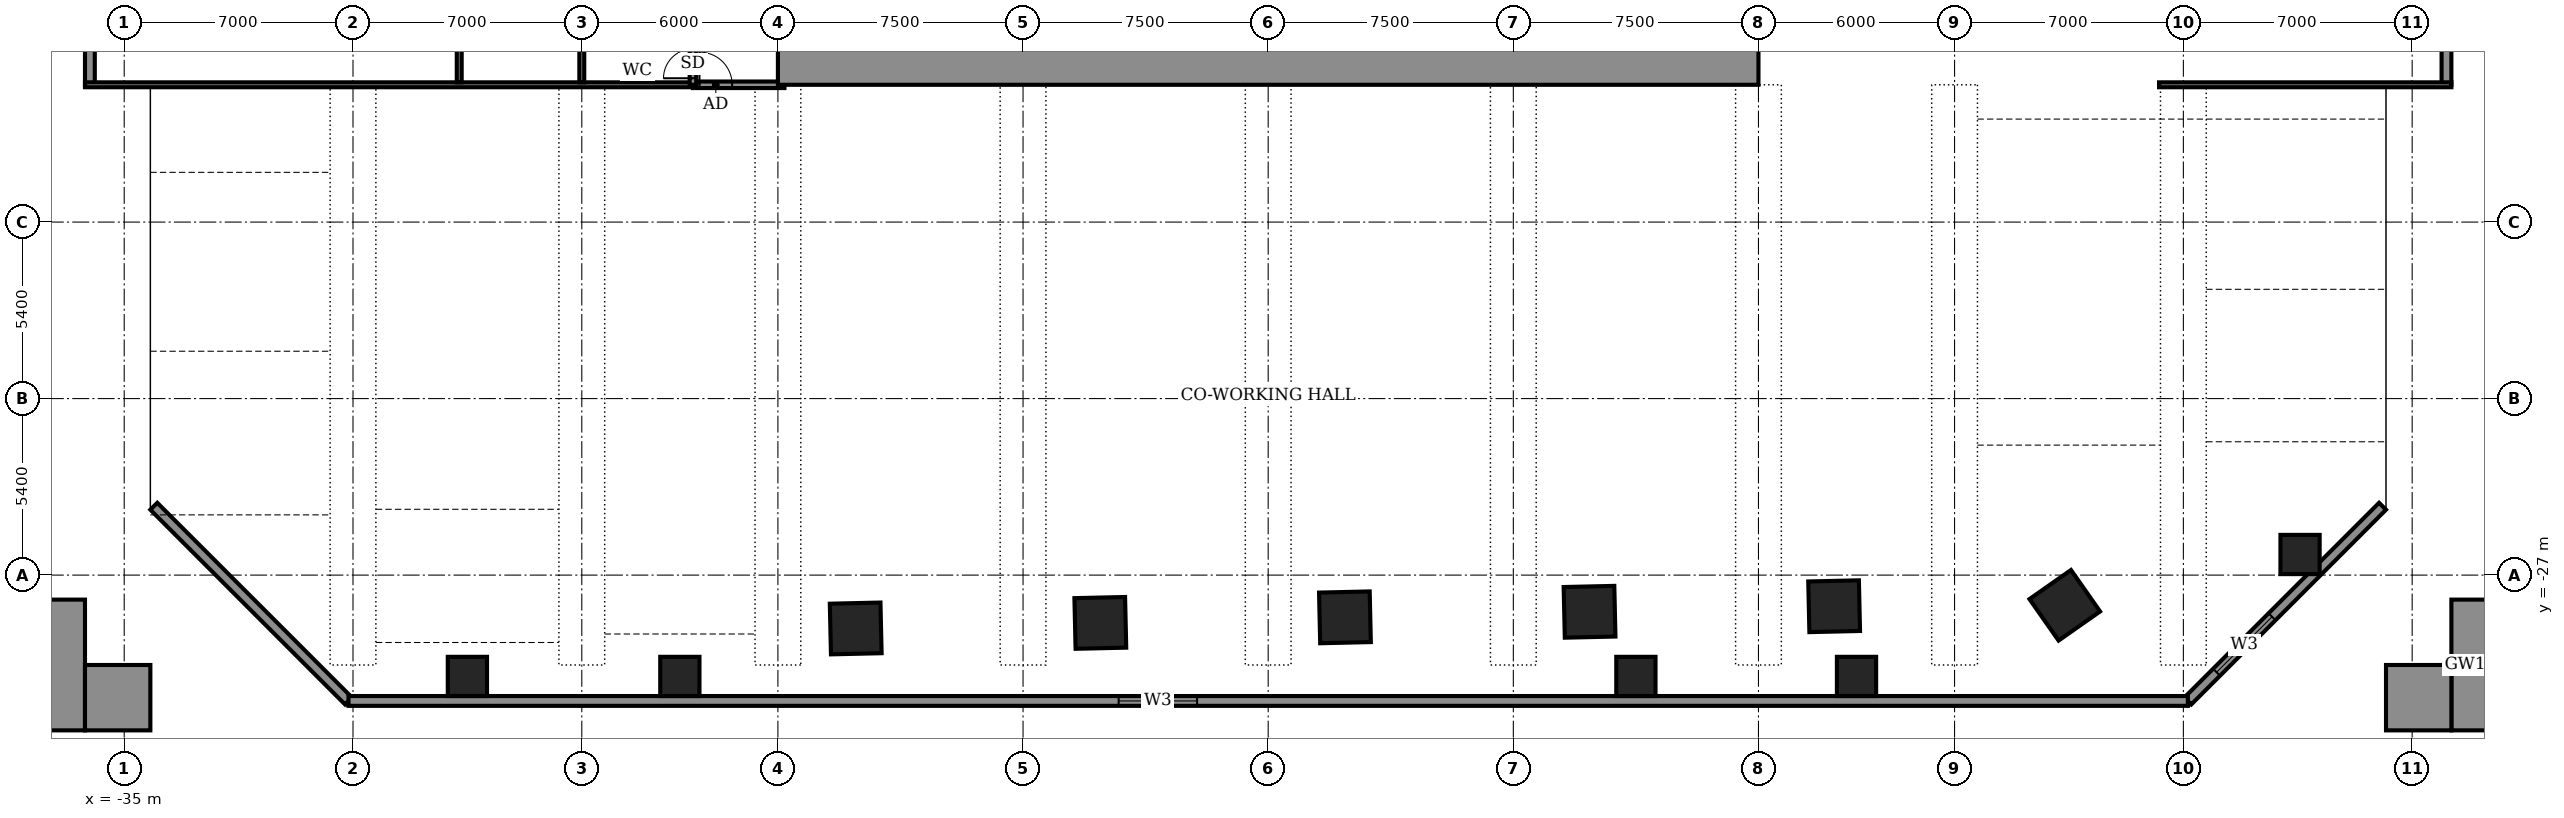
"""IFC4 building model, lengths in metres.
Left out: names, types, materials, properties, quantities, classifications, styles, units other than length and angle.
Written with IfcOpenShell. Run it as: python <this file> out.ifc"""

import sys

from ifc_helpers import new_model, si_unit, direction, frame, frame_2d, origin, origin_2d, place, context, subcontext, project, spatial, rectangle, extrude, element, fill, save


model = new_model("IFC4")
c1 = context("Model", 3, precision=1e-05, world=origin(), true_north=direction((0.0, 1.0)))
c2 = subcontext(c1, "Body", "Model", "MODEL_VIEW")
j1 = project(units=[si_unit("LENGTHUNIT", "METRE"), si_unit("PLANEANGLEUNIT", "RADIAN")], contexts=[c1])
p1 = place(None, origin())
s1 = spatial("IfcSite", under=j1, at=p1, CompositionType="ELEMENT")
p2 = place(p1, origin())
s2 = spatial("IfcBuilding", under=s1, at=p2, CompositionType="ELEMENT")
p3 = place(p2, frame((0.0, 0.0, 20.5)))
s3 = spatial("IfcBuildingStorey", under=s2, at=p3, CompositionType="ELEMENT", Elevation=20.5)
for number, where, z_axis, x_axis in (
    (1, (-12.62, -28.632, -0.55), (0.0, 0.0, 1.0), (1.0, 0.023, 0.0)),
    (2, (-5.135, -28.462, -0.55), (0.0, 0.0, 1.0), (1.0, 0.023, 0.0)),
    (3, (2.348, -28.292, -0.55), (0.0, 0.0, 1.0), (1.0, 0.023, 0.0)),
    (4, (9.833, -28.122, -0.55), (0.0, 0.0, 1.0), (1.0, 0.023, 0.0)),
    (5, (17.315, -27.952, -0.55), (0.0, 0.0, 1.0), (1.0, 0.023, 0.0)),
    (6, (24.372, -27.923, -0.55), (0.0, 0.0, 1.0), (0.819, 0.574, 0.0)),
):
    element("IfcColumn", number, at=place(p3, frame(where, z_axis=z_axis, x_axis=x_axis)), inside=s3, PredefinedType="COLUMN", context=c2, shape_type="SweptSolid", body=[
        extrude(rectangle(XDim=1.55, YDim=1.55, at=origin_2d()), origin(), (0.0, 0.0, 1.0), 4.5),
    ])
for number, where, z_axis, x_axis in (
    (7, (-24.5, -30.1, -0.55), (0.0, 0.0, 1.0), (1.0, 0.0, 0.0)),
    (8, (-18.0, -30.1, -0.55), (0.0, 0.0, 1.0), (1.0, 0.0, 0.0)),
    (9, (11.25, -30.1, -0.55), (0.0, 0.0, 1.0), (1.0, 0.0, 0.0)),
    (10, (18.0, -30.1, -0.55), (0.0, 0.0, 1.0), (1.0, 0.0, 0.0)),
    (11, (31.57, -26.37, -0.55), (0.0, 0.0, 1.0), (1.0, 0.0, 0.0)),
):
    element("IfcColumn", number, at=place(p3, frame(where, z_axis=z_axis, x_axis=x_axis)), inside=s3, PredefinedType="COLUMN", context=c2, shape_type="SweptSolid", body=[
        extrude(rectangle(XDim=1.2, YDim=1.2, at=origin_2d()), origin(), (0.0, 0.0, 1.0), 4.5),
    ])
p4 = place(p3, frame((28.138, -30.85, 0.0), z_axis=(0.0, 0.0, 1.0), x_axis=(0.707106781187, 0.707106781187, 0.0)))
e12 = element("IfcWall", 12, at=p4, inside=s3, PredefinedType="SOLIDWALL", context=c2, shape_type="SweptSolid", body=[
    extrude(rectangle(XDim=8.423, YDim=0.3, at=frame_2d((4.211, 0.0))), origin(), (0.0, 0.0, 1.0), 3.95),
])
p5 = place(p4, frame((1.242, 0.0, 0.9)))
e13 = element("IfcOpeningElement", 13, at=p5, cuts=e12, PredefinedType="OPENING", context=c2, shape_type="SweptSolid", body=[
    extrude(rectangle(XDim=2.4, YDim=1.8, at=frame_2d((1.2, 0.9))), frame((0.0, 0.16, 0.0), z_axis=(0.0, -1.0, 0.0), x_axis=(1.0, 0.0, 0.0)), (0.0, 0.0, 1.0), 0.32),
])
for number, where, z_axis, x_axis in (
    (14, (36.05, -12.0, 0.0), (0.0, 0.0, 1.0), (0.0, 1.0, 0.0)),
    (15, (-36.05, -5.236, 0.0), (0.0, 0.0, 1.0), (0.0, -1.0, 0.0)),
):
    element("IfcWall", number, at=place(p3, frame(where, z_axis=z_axis, x_axis=x_axis)), inside=s3, PredefinedType="SOLIDWALL", context=c2, shape_type="SweptSolid", body=[
        extrude(rectangle(XDim=6.764, YDim=0.3, at=frame_2d((3.382, 0.0))), origin(), (0.0, 0.0, 1.0), 3.95),
    ])
p6 = place(p3, frame((-34.094, -24.894, 0.0), z_axis=(0.0, 0.0, 1.0), x_axis=(0.707106781187, -0.707106781187, 0.0)))
e16 = element("IfcWall", 16, at=p6, inside=s3, PredefinedType="SOLIDWALL", context=c2, shape_type="SweptSolid", body=[
    extrude(rectangle(XDim=8.423, YDim=0.3, at=frame_2d((4.211, 0.0))), origin(), (0.0, 0.0, 1.0), 2.15),
])
p7 = place(p3, frame((-28.138, -30.85, 0.0), z_axis=(0.0, 0.0, 1.0), x_axis=(1.0, 0.0, 0.0)))
e17 = element("IfcWall", 17, at=p7, inside=s3, PredefinedType="SOLIDWALL", context=c2, shape_type="SweptSolid", body=[
    extrude(rectangle(XDim=56.276, YDim=0.3, at=frame_2d((28.138, 0.0))), origin(), (0.0, 0.0, 1.0), 3.95),
])
p8 = place(p7, frame((23.563, 0.0, 0.9)))
e18 = element("IfcOpeningElement", 18, at=p8, cuts=e17, PredefinedType="OPENING", context=c2, shape_type="SweptSolid", body=[
    extrude(rectangle(XDim=2.4, YDim=1.8, at=frame_2d((1.2, 0.9))), frame((0.0, 0.16, 0.0), z_axis=(0.0, -1.0, 0.0), x_axis=(1.0, 0.0, 0.0)), (0.0, 0.0, 1.0), 0.32),
])
p9 = place(p3, frame((37.45, -31.75, 0.0), z_axis=(0.0, 0.0, 1.0), x_axis=(0.0, 1.0, 0.0)))
e19 = element("IfcWall", 19, at=p9, inside=s3, PredefinedType="STANDARD", context=c2, shape_type="SweptSolid", body=[
    extrude(rectangle(XDim=4.0, YDim=2.5, at=frame_2d((2.0, 0.0))), origin(), (0.0, 0.0, 1.0), 4.5),
])
p10 = place(p3, frame((34.2, -30.75, 0.0), z_axis=(0.0, 0.0, 1.0), x_axis=(1.0, 0.0, 0.0)))
e20 = element("IfcWall", 20, at=p10, inside=s3, PredefinedType="STANDARD", context=c2, shape_type="SweptSolid", body=[
    extrude(rectangle(XDim=2.0, YDim=2.0, at=frame_2d((1.0, 0.0))), origin(), (0.0, 0.0, 1.0), 4.5),
])
p11 = place(p3, frame((-37.45, -31.75, 0.0), z_axis=(0.0, 0.0, 1.0), x_axis=(0.0, 1.0, 0.0)))
e21 = element("IfcWall", 21, at=p11, inside=s3, PredefinedType="STANDARD", context=c2, shape_type="SweptSolid", body=[
    extrude(rectangle(XDim=4.0, YDim=2.5, at=frame_2d((2.0, 0.0))), origin(), (0.0, 0.0, 1.0), 4.5),
])
p12 = place(p3, frame((-34.2, -30.75, 0.0), z_axis=(0.0, 0.0, 1.0), x_axis=(-1.0, 0.0, 0.0)))
e22 = element("IfcWall", 22, at=p12, inside=s3, PredefinedType="STANDARD", context=c2, shape_type="SweptSolid", body=[
    extrude(rectangle(XDim=2.0, YDim=2.0, at=frame_2d((1.0, 0.0))), origin(), (0.0, 0.0, 1.0), 4.5),
])
p13 = place(p3, frame((-36.2, -12.0, 0.0), z_axis=(0.0, 0.0, 1.0), x_axis=(1.0, 0.0, 0.0)))
e23 = element("IfcWall", 23, at=p13, inside=s3, PredefinedType="PARTITIONING", context=c2, shape_type="SweptSolid", body=[
    extrude(rectangle(XDim=18.604, YDim=0.15, at=frame_2d((9.302, 0.0))), origin(), (0.0, 0.0, 1.0), 3.95),
])
p14 = place(p3, frame((-24.75, -11.925, 0.0), z_axis=(0.0, 0.0, 1.0), x_axis=(0.0, 1.0, 0.0)))
e24 = element("IfcWall", 24, at=p14, inside=s3, PredefinedType="PARTITIONING", context=c2, shape_type="SweptSolid", body=[
    extrude(rectangle(XDim=23.825, YDim=0.15, at=frame_2d((11.913, 0.0))), origin(), (0.0, 0.0, 1.0), 3.95),
])
p15 = place(p3, frame((-21.0, -11.925, 0.0), z_axis=(0.0, 0.0, 1.0), x_axis=(0.0, 1.0, 0.0)))
e25 = element("IfcWall", 25, at=p15, inside=s3, PredefinedType="PARTITIONING", context=c2, shape_type="SweptSolid", body=[
    extrude(rectangle(XDim=2.725, YDim=0.15, at=frame_2d((1.363, 0.0))), origin(), (0.0, 0.0, 1.0), 3.95),
])
p16 = place(p3, frame((-17.6, -12.0, 0.0), z_axis=(0.0, 0.0, 1.0), x_axis=(1.0, 0.0, 0.0)))
e26 = element("IfcWall", 26, at=p16, inside=s3, PredefinedType="PARTITIONING", context=c2, shape_type="SweptSolid", body=[
    extrude(rectangle(XDim=2.8, YDim=0.2, at=frame_2d((1.4, 0.0))), origin(), (0.0, 0.0, 1.0), 3.95),
])
p17 = place(p16, frame((0.2, 0.0, 0.0)))
e27 = element("IfcOpeningElement", 27, at=p17, cuts=e26, PredefinedType="OPENING", context=c2, shape_type="SweptSolid", body=[
    extrude(rectangle(XDim=1.0, YDim=2.1, at=frame_2d((0.5, 1.05))), frame((0.0, 0.11, 0.0), z_axis=(0.0, -1.0, 0.0), x_axis=(1.0, 0.0, 0.0)), (0.0, 0.0, 1.0), 0.22),
])
p18 = place(p3, frame((-17.6, -12.0, 0.0), z_axis=(0.0, 0.0, 1.0), x_axis=(0.0, 1.0, 0.0)))
e28 = element("IfcWall", 28, at=p18, inside=s3, PredefinedType="PARTITIONING", context=c2, shape_type="SweptSolid", body=[
    extrude(rectangle(XDim=24.0, YDim=0.2, at=frame_2d((12.0, 0.0))), origin(), (0.0, 0.0, 1.0), 3.95),
])
p19 = place(p18, frame((9.578, 0.0, 0.0)))
e29 = element("IfcOpeningElement", 29, at=p19, cuts=e28, PredefinedType="OPENING", context=c2, shape_type="SweptSolid", body=[
    extrude(rectangle(XDim=1.0, YDim=2.1, at=frame_2d((0.5, 1.05))), frame((0.0, 0.11, 0.0), z_axis=(0.0, -1.0, 0.0), x_axis=(1.0, 0.0, 0.0)), (0.0, 0.0, 1.0), 0.22),
])
p20 = place(p18, frame((0.2, 0.0, 0.0)))
e30 = element("IfcOpeningElement", 30, at=p20, cuts=e28, PredefinedType="OPENING", context=c2, shape_type="SweptSolid", body=[
    extrude(rectangle(XDim=0.9, YDim=2.1, at=frame_2d((0.45, 1.05))), frame((0.0, 0.11, 0.0), z_axis=(0.0, -1.0, 0.0), x_axis=(1.0, 0.0, 0.0)), (0.0, 0.0, 1.0), 0.22),
])
p21 = place(p3, frame((27.256, -12.0, 0.0), z_axis=(0.0, 0.0, 1.0), x_axis=(1.0, 0.0, 0.0)))
e31 = element("IfcWall", 31, at=p21, inside=s3, PredefinedType="PARTITIONING", context=c2, shape_type="SweptSolid", body=[
    extrude(rectangle(XDim=8.944, YDim=0.15, at=frame_2d((4.472, 0.0))), origin(), (0.0, 0.0, 1.0), 3.95),
])
p22 = place(p3, frame((-15.0, -11.4, 0.0), z_axis=(0.0, 0.0, 1.0), x_axis=(1.0, 0.0, 0.0)))
e32 = element("IfcWall", 32, at=p22, inside=s3, PredefinedType="SHEAR", context=c2, shape_type="SweptSolid", body=[
    extrude(rectangle(XDim=30.0, YDim=1.2, at=frame_2d((15.0, 0.0))), origin(), (0.0, 0.0, 1.0), 4.5),
])
p23 = place(p5, origin())
e33 = element("IfcWindow", 33, at=p23, inside=s3, PartitioningType="DOUBLE_PANEL_VERTICAL", PredefinedType="WINDOW", context=c2, shape_type="SweptSolid", body=[
    extrude(rectangle(XDim=2.4, YDim=1.8, at=frame_2d((1.2, 0.9))), frame((0.0, 0.03, 0.0), z_axis=(0.0, -1.0, 0.0), x_axis=(1.0, 0.0, 0.0)), (0.0, 0.0, 1.0), 0.06),
])
fill(e13, e33)
p24 = place(p8, origin())
e34 = element("IfcWindow", 34, at=p24, inside=s3, PartitioningType="DOUBLE_PANEL_VERTICAL", PredefinedType="WINDOW", context=c2, shape_type="SweptSolid", body=[
    extrude(rectangle(XDim=2.4, YDim=1.8, at=frame_2d((1.2, 0.9))), frame((0.0, 0.03, 0.0), z_axis=(0.0, -1.0, 0.0), x_axis=(1.0, 0.0, 0.0)), (0.0, 0.0, 1.0), 0.06),
])
fill(e18, e34)
p25 = place(p20, origin())
e35 = element("IfcDoor", 35, at=p25, inside=s3, OperationType="SINGLE_SWING_LEFT", PredefinedType="DOOR", context=c2, shape_type="SweptSolid", body=[
    extrude(rectangle(XDim=0.9, YDim=2.1, at=frame_2d((0.45, 1.05))), frame((0.0, 0.025, 0.0), z_axis=(0.0, -1.0, 0.0), x_axis=(1.0, 0.0, 0.0)), (0.0, 0.0, 1.0), 0.05),
])
fill(e30, e35)
p26 = place(p17, origin())
e36 = element("IfcDoor", 36, at=p26, inside=s3, OperationType="SINGLE_SWING_RIGHT", PredefinedType="DOOR", context=c2, shape_type="SweptSolid", body=[
    extrude(rectangle(XDim=1.0, YDim=2.1, at=frame_2d((0.5, 1.05))), frame((0.0, 0.025, 0.0), z_axis=(0.0, -1.0, 0.0), x_axis=(1.0, 0.0, 0.0)), (0.0, 0.0, 1.0), 0.05),
])
fill(e27, e36)
save(model, sys.argv[1])
